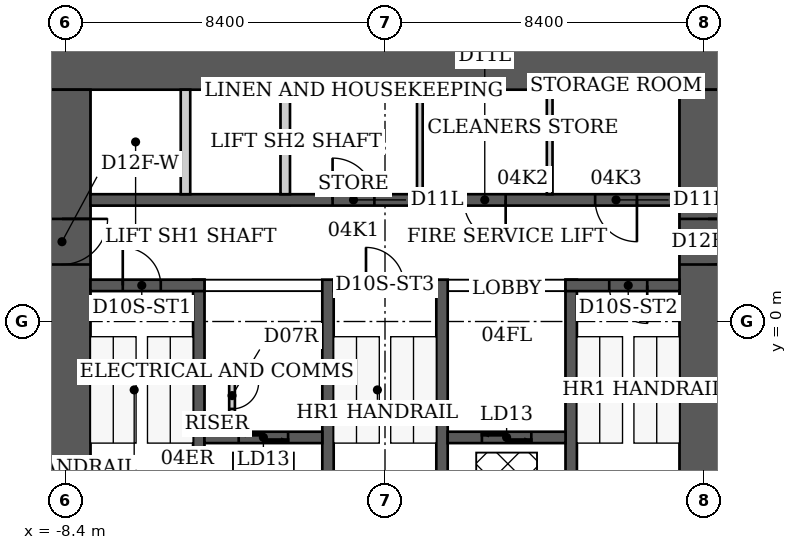
"""IFC4 building model, lengths in metres.
Left out: names, types, materials, properties, quantities, classifications, styles, units other than length and angle.
Written with IfcOpenShell. Run it as: python <this file> out.ifc"""

import sys

from ifc_helpers import new_model, si_unit, direction, frame, frame_2d, origin, place, context, subcontext, project, spatial, rectangle, extrude, element, fill, save


model = new_model("IFC4")
c1 = context("Model", 3, precision=1e-05, world=origin(), true_north=direction((0.0, 1.0)))
c2 = subcontext(c1, "Body", "Model", "MODEL_VIEW")
j1 = project(units=[si_unit("LENGTHUNIT", "METRE"), si_unit("PLANEANGLEUNIT", "RADIAN")], contexts=[c1])
p1 = place(None, origin())
s1 = spatial("IfcSite", under=j1, at=p1, CompositionType="ELEMENT")
p2 = place(p1, origin())
s2 = spatial("IfcBuilding", under=s1, at=p2, CompositionType="ELEMENT")
p3 = place(p2, frame((0.0, 0.0, 23.0)))
s3 = spatial("IfcBuildingStorey", under=s2, at=p3, CompositionType="ELEMENT", Elevation=23.0)
p4 = place(p3, frame((-9.25, 6.85, 0.0), z_axis=(0.0, 0.0, 1.0), x_axis=(1.0, 0.0, 0.0)))
e1 = element("IfcWall", 1, at=p4, inside=s3, PredefinedType="SHEAR", context=c2, shape_type="SweptSolid", body=[
    extrude(rectangle(XDim=18.5, YDim=1.5, at=frame_2d((9.25, 0.0))), origin(), (0.0, 0.0, 1.0), 3.8),
])
p5 = place(p3, frame((-8.5, -9.2, 0.0), z_axis=(0.0, 0.0, 1.0), x_axis=(0.0, 1.0, 0.0)))
e2 = element("IfcWall", 2, at=p5, inside=s3, PredefinedType="SHEAR", context=c2, shape_type="SweptSolid", body=[
    extrude(rectangle(XDim=15.3, YDim=1.5, at=frame_2d((7.65, 0.0))), origin(), (0.0, 0.0, 1.0), 3.8),
])
p6 = place(p5, frame((10.7, 0.0, 0.0)))
e3 = element("IfcOpeningElement", 3, at=p6, cuts=e2, PredefinedType="OPENING", context=c2, shape_type="SweptSolid", body=[
    extrude(rectangle(XDim=1.2, YDim=2.2, at=frame_2d((0.6, 1.1))), frame((0.0, 0.75, 0.0), z_axis=(0.0, -1.0, 0.0), x_axis=(1.0, 0.0, 0.0)), (0.0, 0.0, 1.0), 1.5),
])
p7 = place(p3, frame((8.5, -9.2, 0.0), z_axis=(0.0, 0.0, 1.0), x_axis=(0.0, 1.0, 0.0)))
e4 = element("IfcWall", 4, at=p7, inside=s3, PredefinedType="SHEAR", context=c2, shape_type="SweptSolid", body=[
    extrude(rectangle(XDim=15.3, YDim=1.5, at=frame_2d((7.65, 0.0))), origin(), (0.0, 0.0, 1.0), 3.8),
])
p8 = place(p7, frame((10.7, 0.0, 0.0)))
e5 = element("IfcOpeningElement", 5, at=p8, cuts=e4, PredefinedType="OPENING", context=c2, shape_type="SweptSolid", body=[
    extrude(rectangle(XDim=1.2, YDim=2.2, at=frame_2d((0.6, 1.1))), frame((0.0, 0.75, 0.0), z_axis=(0.0, -1.0, 0.0), x_axis=(1.0, 0.0, 0.0)), (0.0, 0.0, 1.0), 1.5),
])
for number, where, z_axis, x_axis in (
    (6, (-4.9, -6.1, 0.0), (0.0, 0.0, 1.0), (0.0, 1.0, 0.0)),
    (7, (-1.5, -6.1, 0.0), (0.0, 0.0, 1.0), (0.0, 1.0, 0.0)),
    (8, (1.5, -6.1, 0.0), (0.0, 0.0, 1.0), (0.0, 1.0, 0.0)),
    (9, (4.9, -6.1, 0.0), (0.0, 0.0, 1.0), (0.0, 1.0, 0.0)),
):
    element("IfcWall", number, at=place(p3, frame(where, z_axis=z_axis, x_axis=x_axis)), inside=s3, PredefinedType="SHEAR", context=c2, shape_type="SweptSolid", body=[
        extrude(rectangle(XDim=7.2, YDim=0.3, at=frame_2d((3.6, 0.0))), origin(), (0.0, 0.0, 1.0), 3.8),
    ])
p9 = place(p3, frame((-7.75, 0.95, 0.0), z_axis=(0.0, 0.0, 1.0), x_axis=(1.0, 0.0, 0.0)))
e10 = element("IfcWall", 10, at=p9, inside=s3, PredefinedType="SHEAR", context=c2, shape_type="SweptSolid", body=[
    extrude(rectangle(XDim=3.0, YDim=0.3, at=frame_2d((1.5, 0.0))), origin(), (0.0, 0.0, 1.0), 3.8),
])
p10 = place(p9, frame((0.85, 0.0, 0.0)))
e11 = element("IfcOpeningElement", 11, at=p10, cuts=e10, PredefinedType="OPENING", context=c2, shape_type="SweptSolid", body=[
    extrude(rectangle(XDim=1.0, YDim=2.2, at=frame_2d((0.5, 1.1))), frame((0.0, 0.15, 0.0), z_axis=(0.0, -1.0, 0.0), x_axis=(1.0, 0.0, 0.0)), (0.0, 0.0, 1.0), 0.3),
])
p11 = place(p3, frame((-1.35, 0.95, 0.0), z_axis=(0.0, 0.0, 1.0), x_axis=(1.0, 0.0, 0.0)))
e12 = element("IfcWall", 12, at=p11, inside=s3, PredefinedType="SHEAR", context=c2, shape_type="SweptSolid", body=[
    extrude(rectangle(XDim=2.7, YDim=0.3, at=frame_2d((1.35, 0.0))), origin(), (0.0, 0.0, 1.0), 3.8),
])
p12 = place(p11, frame((0.85, 0.0, 0.0)))
e13 = element("IfcOpeningElement", 13, at=p12, cuts=e12, PredefinedType="OPENING", context=c2, shape_type="SweptSolid", body=[
    extrude(rectangle(XDim=1.0, YDim=2.2, at=frame_2d((0.5, 1.1))), frame((0.0, 0.15, 0.0), z_axis=(0.0, -1.0, 0.0), x_axis=(1.0, 0.0, 0.0)), (0.0, 0.0, 1.0), 0.3),
])
p13 = place(p3, frame((4.75, 0.95, 0.0), z_axis=(0.0, 0.0, 1.0), x_axis=(1.0, 0.0, 0.0)))
e14 = element("IfcWall", 14, at=p13, inside=s3, PredefinedType="SHEAR", context=c2, shape_type="SweptSolid", body=[
    extrude(rectangle(XDim=3.0, YDim=0.3, at=frame_2d((1.5, 0.0))), origin(), (0.0, 0.0, 1.0), 3.8),
])
p14 = place(p13, frame((1.15, 0.0, 0.0)))
e15 = element("IfcOpeningElement", 15, at=p14, cuts=e14, PredefinedType="OPENING", context=c2, shape_type="SweptSolid", body=[
    extrude(rectangle(XDim=1.0, YDim=2.2, at=frame_2d((0.5, 1.1))), frame((0.0, 0.15, 0.0), z_axis=(0.0, -1.0, 0.0), x_axis=(1.0, 0.0, 0.0)), (0.0, 0.0, 1.0), 0.3),
])
p15 = place(p3, frame((-4.75, -3.05, 0.0), z_axis=(0.0, 0.0, 1.0), x_axis=(1.0, 0.0, 0.0)))
e16 = element("IfcWall", 16, at=p15, inside=s3, PredefinedType="SHEAR", context=c2, shape_type="SweptSolid", body=[
    extrude(rectangle(XDim=3.1, YDim=0.3, at=frame_2d((1.55, 0.0))), origin(), (0.0, 0.0, 1.0), 3.8),
])
p16 = place(p15, frame((0.9, 0.0, 0.0)))
e17 = element("IfcOpeningElement", 17, at=p16, cuts=e16, PredefinedType="OPENING", context=c2, shape_type="SweptSolid", body=[
    extrude(rectangle(XDim=1.3, YDim=2.1, at=frame_2d((0.65, 1.05))), frame((0.0, 0.15, 0.0), z_axis=(0.0, -1.0, 0.0), x_axis=(1.0, 0.0, 0.0)), (0.0, 0.0, 1.0), 0.3),
])
p17 = place(p3, frame((1.65, -3.05, 0.0), z_axis=(0.0, 0.0, 1.0), x_axis=(1.0, 0.0, 0.0)))
e18 = element("IfcWall", 18, at=p17, inside=s3, PredefinedType="SHEAR", context=c2, shape_type="SweptSolid", body=[
    extrude(rectangle(XDim=3.1, YDim=0.3, at=frame_2d((1.55, 0.0))), origin(), (0.0, 0.0, 1.0), 3.8),
])
p18 = place(p17, frame((0.9, 0.0, 0.0)))
e19 = element("IfcOpeningElement", 19, at=p18, cuts=e18, PredefinedType="OPENING", context=c2, shape_type="SweptSolid", body=[
    extrude(rectangle(XDim=1.3, YDim=2.1, at=frame_2d((0.65, 1.05))), frame((0.0, 0.15, 0.0), z_axis=(0.0, -1.0, 0.0), x_axis=(1.0, 0.0, 0.0)), (0.0, 0.0, 1.0), 0.3),
])
p19 = place(p3, frame((-7.75, 3.2, 0.0), z_axis=(0.0, 0.0, 1.0), x_axis=(1.0, 0.0, 0.0)))
e20 = element("IfcWall", 20, at=p19, inside=s3, PredefinedType="SHEAR", context=c2, shape_type="SweptSolid", body=[
    extrude(rectangle(XDim=15.5, YDim=0.3, at=frame_2d((7.75, 0.0))), origin(), (0.0, 0.0, 1.0), 3.8),
])
p20 = place(p19, frame((6.371, 0.0, 0.0)))
e21 = element("IfcOpeningElement", 21, at=p20, cuts=e20, PredefinedType="OPENING", context=c2, shape_type="SweptSolid", body=[
    extrude(rectangle(XDim=1.1, YDim=2.2, at=frame_2d((0.55, 1.1))), frame((0.0, 0.15, 0.0), z_axis=(0.0, -1.0, 0.0), x_axis=(1.0, 0.0, 0.0)), (0.0, 0.0, 1.0), 0.3),
])
p21 = place(p19, frame((9.825, 0.0, 0.0)))
e22 = element("IfcOpeningElement", 22, at=p21, cuts=e20, PredefinedType="OPENING", context=c2, shape_type="SweptSolid", body=[
    extrude(rectangle(XDim=1.1, YDim=2.2, at=frame_2d((0.55, 1.1))), frame((0.0, 0.15, 0.0), z_axis=(0.0, -1.0, 0.0), x_axis=(1.0, 0.0, 0.0)), (0.0, 0.0, 1.0), 0.3),
])
p22 = place(p19, frame((13.279, 0.0, 0.0)))
e23 = element("IfcOpeningElement", 23, at=p22, cuts=e20, PredefinedType="OPENING", context=c2, shape_type="SweptSolid", body=[
    extrude(rectangle(XDim=1.1, YDim=2.2, at=frame_2d((0.55, 1.1))), frame((0.0, 0.15, 0.0), z_axis=(0.0, -1.0, 0.0), x_axis=(1.0, 0.0, 0.0)), (0.0, 0.0, 1.0), 0.3),
])
for number, where, z_axis, x_axis in (
    (24, (-5.25, 3.35, 0.0), (0.0, 0.0, 1.0), (0.0, 1.0, 0.0)),
    (25, (-2.625, 3.35, 0.0), (0.0, 0.0, 1.0), (0.0, 1.0, 0.0)),
):
    element("IfcWall", number, at=place(p3, frame(where, z_axis=z_axis, x_axis=x_axis)), inside=s3, PredefinedType="PARTITIONING", context=c2, shape_type="SweptSolid", body=[
        extrude(rectangle(XDim=2.75, YDim=0.25, at=frame_2d((1.375, 0.0))), origin(), (0.0, 0.0, 1.0), 3.8),
    ])
p23 = place(p3, frame((-4.025, -2.9, 0.0), z_axis=(0.0, 0.0, 1.0), x_axis=(0.0, 1.0, 0.0)))
e26 = element("IfcWall", 26, at=p23, inside=s3, PredefinedType="PARTITIONING", context=c2, shape_type="SweptSolid", body=[
    extrude(rectangle(XDim=1.775, YDim=0.15, at=frame_2d((0.887, 0.0))), origin(), (0.0, 0.0, 1.0), 3.64),
])
p24 = place(p23, frame((0.6, 0.0, 0.0)))
e27 = element("IfcOpeningElement", 27, at=p24, cuts=e26, PredefinedType="OPENING", context=c2, shape_type="SweptSolid", body=[
    extrude(rectangle(XDim=0.7, YDim=2.1, at=frame_2d((0.35, 1.05))), frame((0.0, 0.075, 0.0), z_axis=(0.0, -1.0, 0.0), x_axis=(1.0, 0.0, 0.0)), (0.0, 0.0, 1.0), 0.15),
])
p25 = place(p3, frame((-4.75, -1.2, 0.0), z_axis=(0.0, 0.0, 1.0), x_axis=(1.0, 0.0, 0.0)))
e28 = element("IfcWall", 28, at=p25, inside=s3, PredefinedType="PARTITIONING", context=c2, shape_type="SweptSolid", body=[
    extrude(rectangle(XDim=0.8, YDim=0.15, at=frame_2d((0.4, 0.0))), origin(), (0.0, 0.0, 1.0), 3.64),
])
for number, where, z_axis, x_axis in (
    (29, (0.917, 3.35, 0.0), (0.0, 0.0, 1.0), (0.0, 1.0, 0.0)),
    (30, (4.333, 3.35, 0.0), (0.0, 0.0, 1.0), (0.0, 1.0, 0.0)),
):
    element("IfcWall", number, at=place(p3, frame(where, z_axis=z_axis, x_axis=x_axis)), inside=s3, PredefinedType="PARTITIONING", context=c2, shape_type="SweptSolid", body=[
        extrude(rectangle(XDim=2.75, YDim=0.15, at=frame_2d((1.375, 0.0))), origin(), (0.0, 0.0, 1.0), 3.64),
    ])
p26 = place(p10, origin())
e31 = element("IfcDoor", 31, at=p26, inside=s3, OperationType="SINGLE_SWING_LEFT", PredefinedType="DOOR", context=c2, shape_type="SweptSolid", body=[
    extrude(rectangle(XDim=1.0, YDim=2.2, at=frame_2d((0.5, 1.1))), frame((0.0, 0.025, 0.0), z_axis=(0.0, -1.0, 0.0), x_axis=(1.0, 0.0, 0.0)), (0.0, 0.0, 1.0), 0.05),
])
fill(e11, e31)
p27 = place(p12, origin())
e32 = element("IfcDoor", 32, at=p27, inside=s3, OperationType="SINGLE_SWING_LEFT", PredefinedType="DOOR", context=c2, shape_type="SweptSolid", body=[
    extrude(rectangle(XDim=1.0, YDim=2.2, at=frame_2d((0.5, 1.1))), frame((0.0, 0.025, 0.0), z_axis=(0.0, -1.0, 0.0), x_axis=(1.0, 0.0, 0.0)), (0.0, 0.0, 1.0), 0.05),
])
fill(e13, e32)
p28 = place(p14, origin())
e33 = element("IfcDoor", 33, at=p28, inside=s3, OperationType="SINGLE_SWING_RIGHT", PredefinedType="DOOR", context=c2, shape_type="SweptSolid", body=[
    extrude(rectangle(XDim=1.0, YDim=2.2, at=frame_2d((0.5, 1.1))), frame((0.0, 0.025, 0.0), z_axis=(0.0, -1.0, 0.0), x_axis=(1.0, 0.0, 0.0)), (0.0, 0.0, 1.0), 0.05),
])
fill(e15, e33)
p29 = place(p6, origin())
e34 = element("IfcDoor", 34, at=p29, inside=s3, OperationType="SINGLE_SWING_RIGHT", PredefinedType="DOOR", context=c2, shape_type="SweptSolid", body=[
    extrude(rectangle(XDim=1.2, YDim=2.2, at=frame_2d((0.6, 1.1))), frame((0.0, 0.025, 0.0), z_axis=(0.0, -1.0, 0.0), x_axis=(1.0, 0.0, 0.0)), (0.0, 0.0, 1.0), 0.05),
])
fill(e3, e34)
p30 = place(p8, origin())
e35 = element("IfcDoor", 35, at=p30, inside=s3, OperationType="SINGLE_SWING_RIGHT", PredefinedType="DOOR", context=c2, shape_type="SweptSolid", body=[
    extrude(rectangle(XDim=1.2, YDim=2.2, at=frame_2d((0.6, 1.1))), frame((0.0, 0.025, 0.0), z_axis=(0.0, -1.0, 0.0), x_axis=(1.0, 0.0, 0.0)), (0.0, 0.0, 1.0), 0.05),
])
fill(e5, e35)
p31 = place(p24, origin())
e36 = element("IfcDoor", 36, at=p31, inside=s3, OperationType="SINGLE_SWING_RIGHT", PredefinedType="DOOR", context=c2, shape_type="SweptSolid", body=[
    extrude(rectangle(XDim=0.7, YDim=2.1, at=frame_2d((0.35, 1.05))), frame((0.0, 0.025, 0.0), z_axis=(0.0, -1.0, 0.0), x_axis=(1.0, 0.0, 0.0)), (0.0, 0.0, 1.0), 0.05),
])
fill(e27, e36)
p32 = place(p20, origin())
e37 = element("IfcDoor", 37, at=p32, inside=s3, OperationType="SINGLE_SWING_LEFT", PredefinedType="DOOR", context=c2, shape_type="SweptSolid", body=[
    extrude(rectangle(XDim=1.1, YDim=2.2, at=frame_2d((0.55, 1.1))), frame((0.0, 0.025, 0.0), z_axis=(0.0, -1.0, 0.0), x_axis=(1.0, 0.0, 0.0)), (0.0, 0.0, 1.0), 0.05),
])
fill(e21, e37)
p33 = place(p21, origin())
e38 = element("IfcDoor", 38, at=p33, inside=s3, OperationType="SINGLE_SWING_RIGHT", PredefinedType="DOOR", context=c2, shape_type="SweptSolid", body=[
    extrude(rectangle(XDim=1.1, YDim=2.2, at=frame_2d((0.55, 1.1))), frame((0.0, 0.025, 0.0), z_axis=(0.0, -1.0, 0.0), x_axis=(1.0, 0.0, 0.0)), (0.0, 0.0, 1.0), 0.05),
])
fill(e22, e38)
p34 = place(p22, origin())
e39 = element("IfcDoor", 39, at=p34, inside=s3, OperationType="SINGLE_SWING_RIGHT", PredefinedType="DOOR", context=c2, shape_type="SweptSolid", body=[
    extrude(rectangle(XDim=1.1, YDim=2.2, at=frame_2d((0.55, 1.1))), frame((0.0, 0.025, 0.0), z_axis=(0.0, -1.0, 0.0), x_axis=(1.0, 0.0, 0.0)), (0.0, 0.0, 1.0), 0.05),
])
fill(e23, e39)
p35 = place(p16, origin())
e40 = element("IfcDoor", 40, at=p35, inside=s3, OperationType="DOUBLE_DOOR_SLIDING", PredefinedType="DOOR", context=c2, shape_type="SweptSolid", body=[
    extrude(rectangle(XDim=1.3, YDim=2.1, at=frame_2d((0.65, 1.05))), frame((0.0, 0.025, 0.0), z_axis=(0.0, -1.0, 0.0), x_axis=(1.0, 0.0, 0.0)), (0.0, 0.0, 1.0), 0.05),
])
fill(e17, e40)
p36 = place(p18, origin())
e41 = element("IfcDoor", 41, at=p36, inside=s3, OperationType="DOUBLE_DOOR_SLIDING", PredefinedType="DOOR", context=c2, shape_type="SweptSolid", body=[
    extrude(rectangle(XDim=1.3, YDim=2.1, at=frame_2d((0.65, 1.05))), frame((0.0, 0.025, 0.0), z_axis=(0.0, -1.0, 0.0), x_axis=(1.0, 0.0, 0.0)), (0.0, 0.0, 1.0), 0.05),
])
fill(e19, e41)
save(model, sys.argv[1])
